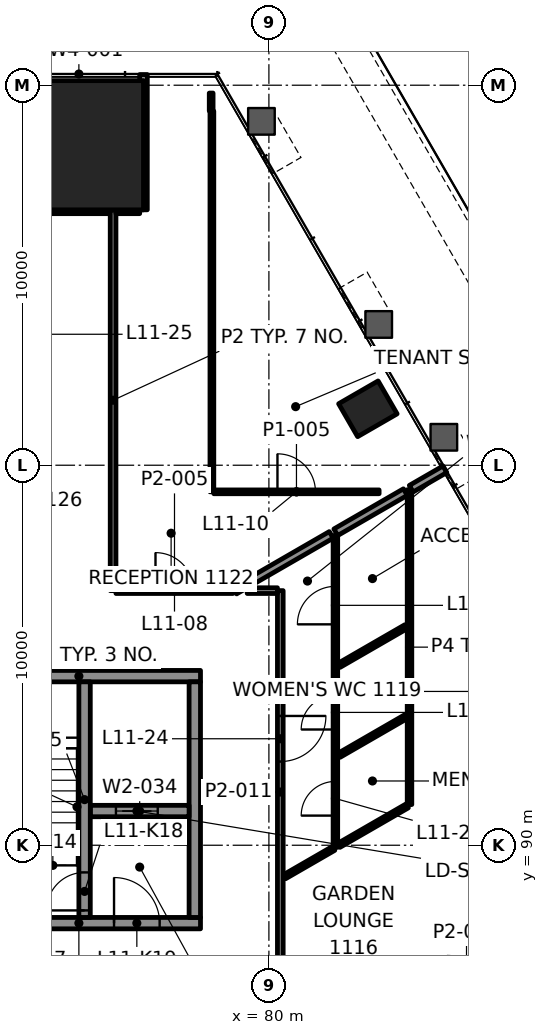
"""IFC4 building model, lengths in metres.
Left out: names, types, materials, properties, quantities, classifications, styles, units other than length and angle.
Written with IfcOpenShell. Run it as: python <this file> out.ifc"""

import sys

from ifc_helpers import new_model, si_unit, direction, frame, frame_2d, origin, origin_2d, place, context, subcontext, project, spatial, rectangle, extrude, element, fill, save


model = new_model("IFC4")
c1 = context("Model", 3, precision=1e-05, world=origin(), true_north=direction((0.0, 1.0)))
c2 = subcontext(c1, "Body", "Model", "MODEL_VIEW")
j1 = project(units=[si_unit("LENGTHUNIT", "METRE"), si_unit("PLANEANGLEUNIT", "RADIAN")], contexts=[c1])
p1 = place(None, origin())
s1 = spatial("IfcSite", under=j1, at=p1, CompositionType="ELEMENT")
p2 = place(p1, origin())
s2 = spatial("IfcBuilding", under=s1, at=p2, CompositionType="ELEMENT")
p3 = place(p2, frame((0.0, 0.0, 52.6)))
s3 = spatial("IfcBuildingStorey", under=s2, at=p3, CompositionType="ELEMENT", Elevation=52.6)
p4 = place(p3, frame((75.0, 108.42, 0.0), z_axis=(0.0, 0.0, 1.0), x_axis=(-1.0, 0.0, 0.0)))
e1 = element("IfcColumn", 1, at=p4, inside=s3, PredefinedType="COLUMN", context=c2, shape_type="SweptSolid", body=[
    extrude(rectangle(XDim=3.4, YDim=3.4, at=origin_2d()), origin(), (0.0, 0.0, 1.0), 4.2),
])
p5 = place(p3, frame((82.604, 101.485, -0.0), z_axis=(0.0, 0.0, 1.0), x_axis=(-0.5, 0.866025403784, 0.0)))
e2 = element("IfcColumn", 2, at=p5, inside=s3, PredefinedType="COLUMN", context=c2, shape_type="SweptSolid", body=[
    extrude(rectangle(XDim=1.0, YDim=1.2, at=origin_2d()), origin(), (0.0, 0.0, 1.0), 4.2),
])
p6 = place(p3, frame((71.8, 87.95, 0.0), z_axis=(0.0, 0.0, 1.0), x_axis=(1.0, 0.0, 0.0)))
e3 = element("IfcWall", 3, at=p6, inside=s3, PredefinedType="SHEAR", context=c2, shape_type="SweptSolid", body=[
    extrude(rectangle(XDim=6.4, YDim=0.3, at=frame_2d((3.2, 0.0))), origin(), (0.0, 0.0, 1.0), 4.0),
])
p7 = place(p6, frame((1.325, 0.0, 0.0)))
e4 = element("IfcOpeningElement", 4, at=p7, cuts=e3, PredefinedType="OPENING", context=c2, shape_type="SweptSolid", body=[
    extrude(rectangle(XDim=1.0, YDim=2.1, at=frame_2d((0.5, 1.05))), frame((0.0, 0.16, 0.0), z_axis=(0.0, -1.0, 0.0), x_axis=(1.0, 0.0, 0.0)), (0.0, 0.0, 1.0), 0.32),
])
p8 = place(p6, frame((4.125, 0.0, 0.0)))
e5 = element("IfcOpeningElement", 5, at=p8, cuts=e3, PredefinedType="OPENING", context=c2, shape_type="SweptSolid", body=[
    extrude(rectangle(XDim=1.2, YDim=2.1, at=frame_2d((0.6, 1.05))), frame((0.0, 0.16, 0.0), z_axis=(0.0, -1.0, 0.0), x_axis=(1.0, 0.0, 0.0)), (0.0, 0.0, 1.0), 0.32),
])
p9 = place(p3, frame((71.8, 94.45, 0.0), z_axis=(0.0, 0.0, 1.0), x_axis=(1.0, 0.0, 0.0)))
e6 = element("IfcWall", 6, at=p9, inside=s3, PredefinedType="SHEAR", context=c2, shape_type="SweptSolid", body=[
    extrude(rectangle(XDim=6.4, YDim=0.3, at=frame_2d((3.2, 0.0))), origin(), (0.0, 0.0, 1.0), 4.0),
])
p10 = place(p3, frame((78.05, 88.1, 0.0), z_axis=(0.0, 0.0, 1.0), x_axis=(0.0, 1.0, 0.0)))
e7 = element("IfcWall", 7, at=p10, inside=s3, PredefinedType="SHEAR", context=c2, shape_type="SweptSolid", body=[
    extrude(rectangle(XDim=6.2, YDim=0.3, at=frame_2d((3.1, 0.0))), origin(), (0.0, 0.0, 1.0), 4.0),
])
p11 = place(p3, frame((75.3, 90.9, 0.0), z_axis=(0.0, 0.0, 1.0), x_axis=(1.0, 0.0, 0.0)))
e8 = element("IfcWall", 8, at=p11, inside=s3, PredefinedType="SHEAR", context=c2, shape_type="SweptSolid", body=[
    extrude(rectangle(XDim=2.6, YDim=0.3, at=frame_2d((1.3, 0.0))), origin(), (0.0, 0.0, 1.0), 4.0),
])
p12 = place(p11, frame((0.675, 0.0, 0.0)))
e9 = element("IfcOpeningElement", 9, at=p12, cuts=e8, PredefinedType="OPENING", context=c2, shape_type="SweptSolid", body=[
    extrude(rectangle(XDim=1.1, YDim=2.1, at=frame_2d((0.55, 1.05))), frame((0.0, 0.16, 0.0), z_axis=(0.0, -1.0, 0.0), x_axis=(1.0, 0.0, 0.0)), (0.0, 0.0, 1.0), 0.32),
])
p13 = place(p3, frame((75.15, 88.1, 0.0), z_axis=(0.0, 0.0, 1.0), x_axis=(0.0, 1.0, 0.0)))
e10 = element("IfcWall", 10, at=p13, inside=s3, PredefinedType="SHEAR", context=c2, shape_type="SweptSolid", body=[
    extrude(rectangle(XDim=6.2, YDim=0.3, at=frame_2d((3.1, 0.0))), origin(), (0.0, 0.0, 1.0), 4.0),
])
p14 = place(p13, frame((0.185, 0.0, 0.0)))
e11 = element("IfcOpeningElement", 11, at=p14, cuts=e10, PredefinedType="OPENING", context=c2, shape_type="SweptSolid", body=[
    extrude(rectangle(XDim=1.0, YDim=2.1, at=frame_2d((0.5, 1.05))), frame((0.0, 0.16, 0.0), z_axis=(0.0, -1.0, 0.0), x_axis=(1.0, 0.0, 0.0)), (0.0, 0.0, 1.0), 0.32),
])
p15 = place(p3, frame((75.975, 96.7, 0.0), z_axis=(0.0, 0.0, 1.0), x_axis=(1.0, 0.0, 0.0)))
e12 = element("IfcWall", 12, at=p15, inside=s3, PredefinedType="PARTITIONING", context=c2, shape_type="SweptSolid", body=[
    extrude(rectangle(XDim=3.082, YDim=0.15, at=frame_2d((1.541, 0.0))), origin(), (0.0, 0.0, 1.0), 3.4),
])
p16 = place(p15, frame((1.041, 0.0, 0.0)))
e13 = element("IfcOpeningElement", 13, at=p16, cuts=e12, PredefinedType="OPENING", context=c2, shape_type="SweptSolid", body=[
    extrude(rectangle(XDim=1.0, YDim=2.1, at=frame_2d((0.5, 1.05))), frame((0.0, 0.085, 0.0), z_axis=(0.0, -1.0, 0.0), x_axis=(1.0, 0.0, 0.0)), (0.0, 0.0, 1.0), 0.17),
])
p17 = place(p3, frame((78.551, 99.3, 0.0), z_axis=(0.0, 0.0, 1.0), x_axis=(1.0, 0.0, 0.0)))
e14 = element("IfcWall", 14, at=p17, inside=s3, PredefinedType="PARTITIONING", context=c2, shape_type="SweptSolid", body=[
    extrude(rectangle(XDim=4.349, YDim=0.1, at=frame_2d((2.175, 0.0))), origin(), (0.0, 0.0, 1.0), 3.4),
])
p18 = place(p17, frame((1.675, 0.0, 0.0)))
e15 = element("IfcOpeningElement", 15, at=p18, cuts=e14, PredefinedType="OPENING", context=c2, shape_type="SweptSolid", body=[
    extrude(rectangle(XDim=1.0, YDim=2.1, at=frame_2d((0.5, 1.05))), frame((0.0, 0.06, 0.0), z_axis=(0.0, -1.0, 0.0), x_axis=(1.0, 0.0, 0.0)), (0.0, 0.0, 1.0), 0.12),
])
p19 = place(p3, frame((74.176, 106.72, 0.0), z_axis=(0.0, 0.0, 1.0), x_axis=(1.0, 0.0, 0.0)))
e16 = element("IfcWall", 16, at=p19, inside=s3, PredefinedType="PARTITIONING", context=c2, shape_type="SweptSolid", body=[
    extrude(rectangle(XDim=1.649, YDim=0.2, at=frame_2d((0.825, 0.0))), origin(), (0.0, 0.0, 1.0), 3.397),
])
p20 = place(p3, frame((80.41, 89.17, 0.0), z_axis=(0.0, 0.0, 1.0), x_axis=(0.866055123991, 0.49994851956, 0.0)))
e17 = element("IfcWall", 17, at=p20, inside=s3, PredefinedType="PARTITIONING", context=c2, shape_type="SweptSolid", body=[
    extrude(rectangle(XDim=1.496, YDim=0.12, at=frame_2d((0.748, 0.0))), origin(), (0.0, 0.0, 1.0), 3.4),
])
p21 = place(p3, frame((81.845, 92.366, 0.0), z_axis=(0.0, 0.0, 1.0), x_axis=(0.866069607179, 0.499923429657, 0.0)))
e18 = element("IfcWall", 18, at=p21, inside=s3, PredefinedType="PARTITIONING", context=c2, shape_type="SweptSolid", body=[
    extrude(rectangle(XDim=2.033, YDim=0.12, at=frame_2d((1.017, 0.0))), origin(), (0.0, 0.0, 1.0), 3.4),
])
p22 = place(p3, frame((81.845, 94.733, 0.0), z_axis=(0.0, 0.0, 1.0), x_axis=(0.866017611601, 0.500013496215, 0.0)))
e19 = element("IfcWall", 19, at=p22, inside=s3, PredefinedType="PARTITIONING", context=c2, shape_type="SweptSolid", body=[
    extrude(rectangle(XDim=2.033, YDim=0.12, at=frame_2d((1.017, 0.0))), origin(), (0.0, 0.0, 1.0), 3.4),
])
p23 = place(p3, frame((79.1, 96.7, 0.0), z_axis=(0.0, 0.0, 1.0), x_axis=(0.866031706645, 0.499989082967, 0.0)))
e20 = element("IfcWall", 20, at=p23, inside=s3, PredefinedType="PARTITIONING", context=c2, shape_type="SweptSolid", body=[
    extrude(rectangle(XDim=2.933, YDim=0.2, at=frame_2d((1.466, 0.0))), origin(), (0.0, 0.0, 1.0), 3.4),
])
p24 = place(p3, frame((83.7, 91.07, 0.0), z_axis=(0.0, 0.0, 1.0), x_axis=(0.0, 1.0, 0.0)))
e21 = element("IfcWall", 21, at=p24, inside=s3, PredefinedType="PARTITIONING", context=c2, shape_type="SweptSolid", body=[
    extrude(rectangle(XDim=8.285, YDim=0.12, at=frame_2d((4.143, 0.0))), origin(), (0.0, 0.0, 1.0), 3.165),
])
p25 = place(p3, frame((81.75, 89.944, 0.0), z_axis=(0.0, 0.0, 1.0), x_axis=(0.0, 1.0, 0.0)))
e22 = element("IfcWall", 22, at=p25, inside=s3, PredefinedType="PARTITIONING", context=c2, shape_type="SweptSolid", body=[
    extrude(rectangle(XDim=8.206, YDim=0.12, at=frame_2d((4.103, 0.0))), origin(), (0.0, 0.0, 1.0), 3.4),
])
p26 = place(p25, frame((0.835, 0.0, 0.0)))
e23 = element("IfcOpeningElement", 23, at=p26, cuts=e22, PredefinedType="OPENING", context=c2, shape_type="SweptSolid", body=[
    extrude(rectangle(XDim=0.9, YDim=2.1, at=frame_2d((0.45, 1.05))), frame((0.0, 0.07, 0.0), z_axis=(0.0, -1.0, 0.0), x_axis=(1.0, 0.0, 0.0)), (0.0, 0.0, 1.0), 0.14),
])
p27 = place(p25, frame((3.101, 0.0, 0.0)))
e24 = element("IfcOpeningElement", 24, at=p27, cuts=e22, PredefinedType="OPENING", context=c2, shape_type="SweptSolid", body=[
    extrude(rectangle(XDim=0.9, YDim=2.1, at=frame_2d((0.45, 1.05))), frame((0.0, 0.07, 0.0), z_axis=(0.0, -1.0, 0.0), x_axis=(1.0, 0.0, 0.0)), (0.0, 0.0, 1.0), 0.14),
])
p28 = place(p25, frame((5.869, 0.0, 0.0)))
e25 = element("IfcOpeningElement", 25, at=p28, cuts=e22, PredefinedType="OPENING", context=c2, shape_type="SweptSolid", body=[
    extrude(rectangle(XDim=1.0, YDim=2.1, at=frame_2d((0.5, 1.05))), frame((0.0, 0.07, 0.0), z_axis=(0.0, -1.0, 0.0), x_axis=(1.0, 0.0, 0.0)), (0.0, 0.0, 1.0), 0.14),
])
p29 = place(p3, frame((80.3, 96.7, 0.0), z_axis=(0.0, 0.0, 1.0), x_axis=(0.0, -1.0, 0.0)))
e26 = element("IfcWall", 26, at=p29, inside=s3, PredefinedType="PARTITIONING", context=c2, shape_type="SweptSolid", body=[
    extrude(rectangle(XDim=10.6, YDim=0.15, at=frame_2d((5.3, 0.0))), origin(), (0.0, 0.0, 1.0), 3.4),
])
p30 = place(p29, frame((3.298, 0.0, 0.0)))
e27 = element("IfcOpeningElement", 27, at=p30, cuts=e26, PredefinedType="OPENING", context=c2, shape_type="SweptSolid", body=[
    extrude(rectangle(XDim=1.2, YDim=2.1, at=frame_2d((0.6, 1.05))), frame((0.0, 0.085, 0.0), z_axis=(0.0, -1.0, 0.0), x_axis=(1.0, 0.0, 0.0)), (0.0, 0.0, 1.0), 0.17),
])
p31 = place(p3, frame((78.5, 99.301, 0.0), z_axis=(0.0, 0.0, 1.0), x_axis=(0.0, 1.0, 0.0)))
e28 = element("IfcWall", 28, at=p31, inside=s3, PredefinedType="PARTITIONING", context=c2, shape_type="SweptSolid", body=[
    extrude(rectangle(XDim=10.02, YDim=0.1, at=frame_2d((5.01, 0.0))), origin(), (0.0, 0.0, 1.0), 3.4),
])
p32 = place(p3, frame((78.481, 109.321, 0.0), z_axis=(0.0, 0.0, 1.0), x_axis=(0.0, 1.0, 0.0)))
e29 = element("IfcWall", 29, at=p32, inside=s3, PredefinedType="PARTITIONING", context=c2, shape_type="SweptSolid", body=[
    extrude(rectangle(XDim=0.473, YDim=0.1, at=frame_2d((0.236, 0.0))), origin(), (0.0, 0.0, 1.0), 3.4),
])
p33 = place(p3, frame((76.7, 106.721, 0.0), z_axis=(0.0, 0.0, 1.0), x_axis=(0.0, 1.0, 0.0)))
e30 = element("IfcWall", 30, at=p33, inside=s3, PredefinedType="PARTITIONING", context=c2, shape_type="SweptSolid", body=[
    extrude(rectangle(XDim=3.56, YDim=0.2, at=frame_2d((1.78, 0.0))), origin(), (0.0, 0.0, 1.0), 3.4),
])
p34 = place(p3, frame((75.9, 96.7, 0.0), z_axis=(0.0, 0.0, 1.0), x_axis=(0.0, 1.0, 0.0)))
e31 = element("IfcWall", 31, at=p34, inside=s3, PredefinedType="PARTITIONING", context=c2, shape_type="SweptSolid", body=[
    extrude(rectangle(XDim=10.02, YDim=0.15, at=frame_2d((5.01, 0.0))), origin(), (0.0, 0.0, 1.0), 3.4),
])
p35 = place(p3, frame((79.429, 96.7, 0.0), z_axis=(0.0, 0.0, 1.0), x_axis=(1.0, 0.0, 0.0)))
e32 = element("IfcWall", 32, at=p35, inside=s3, PredefinedType="PARTITIONING", context=c2, shape_type="SweptSolid", body=[
    extrude(rectangle(XDim=0.796, YDim=0.15, at=frame_2d((0.398, 0.0))), origin(), (0.0, 0.0, 1.0), 3.4),
])
p36 = place(p3, frame((75.975, 106.72, 0.0), z_axis=(0.0, 0.0, 1.0), x_axis=(1.0, 0.0, 0.0)))
e33 = element("IfcWall", 33, at=p36, inside=s3, PredefinedType="PARTITIONING", context=c2, shape_type="SweptSolid", body=[
    extrude(rectangle(XDim=0.625, YDim=0.2, at=frame_2d((0.312, 0.0))), origin(), (0.0, 0.0, 1.0), 3.4),
])
p37 = place(p3, frame((81.84, 89.996, 0.0), z_axis=(0.0, 0.0, 1.0), x_axis=(0.866015411258, 0.500017307165, 0.0)))
e34 = element("IfcWall", 34, at=p37, inside=s3, PredefinedType="PARTITIONING", context=c2, shape_type="SweptSolid", body=[
    extrude(rectangle(XDim=2.079, YDim=0.12, at=frame_2d((1.039, 0.0))), origin(), (0.0, 0.0, 1.0), 3.4),
])
p38 = place(p3, frame((83.745, 99.382, 0.0), z_axis=(0.0, 0.0, 1.0), x_axis=(0.866062461731, 0.499935808259, 0.0)))
e35 = element("IfcWall", 35, at=p38, inside=s3, PredefinedType="PARTITIONING", context=c2, shape_type="SweptSolid", body=[
    extrude(rectangle(XDim=1.024, YDim=0.2, at=frame_2d((0.512, 0.0))), origin(), (0.0, 0.0, 1.0), 3.165),
])
p39 = place(p3, frame((81.76, 98.236, 0.0), z_axis=(0.0, 0.0, 1.0), x_axis=(0.866037425094, 0.499979177903, 0.0)))
e36 = element("IfcWall", 36, at=p39, inside=s3, PredefinedType="PARTITIONING", context=c2, shape_type="SweptSolid", body=[
    extrude(rectangle(XDim=2.113, YDim=0.2, at=frame_2d((1.056, 0.0))), origin(), (0.0, 0.0, 1.0), 3.4),
])
p40 = place(p3, frame((110.994, 61.012, 0.0), z_axis=(0.0, 0.0, 1.0), x_axis=(-0.500000853759, 0.866024910866, 0.0)))
e37 = element("IfcWall", 37, at=p40, inside=s3, PredefinedType="SOLIDWALL", context=c2, shape_type="SweptSolid", body=[
    extrude(rectangle(XDim=60.222, YDim=0.8, at=frame_2d((30.111, 0.0))), origin(), (0.0, 0.0, 1.0), 0.9),
])
p41 = place(p16, origin())
e38 = element("IfcDoor", 38, at=p41, inside=s3, OperationType="SINGLE_SWING_LEFT", PredefinedType="DOOR", context=c2, shape_type="SweptSolid", body=[
    extrude(rectangle(XDim=1.0, YDim=2.1, at=frame_2d((0.5, 1.05))), frame((0.0, 0.025, 0.0), z_axis=(0.0, -1.0, 0.0), x_axis=(1.0, 0.0, 0.0)), (0.0, 0.0, 1.0), 0.05),
])
fill(e13, e38)
p42 = place(p18, origin())
e39 = element("IfcDoor", 39, at=p42, inside=s3, OperationType="SINGLE_SWING_RIGHT", PredefinedType="DOOR", context=c2, shape_type="SweptSolid", body=[
    extrude(rectangle(XDim=1.0, YDim=2.1, at=frame_2d((0.5, 1.05))), frame((0.0, 0.025, 0.0), z_axis=(0.0, -1.0, 0.0), x_axis=(1.0, 0.0, 0.0)), (0.0, 0.0, 1.0), 0.05),
])
fill(e15, e39)
p43 = place(p26, origin())
e40 = element("IfcDoor", 40, at=p43, inside=s3, OperationType="SINGLE_SWING_LEFT", PredefinedType="DOOR", context=c2, shape_type="SweptSolid", body=[
    extrude(rectangle(XDim=0.9, YDim=2.1, at=frame_2d((0.45, 1.05))), frame((0.0, 0.025, 0.0), z_axis=(0.0, -1.0, 0.0), x_axis=(1.0, 0.0, 0.0)), (0.0, 0.0, 1.0), 0.05),
])
fill(e23, e40)
p44 = place(p27, origin())
e41 = element("IfcDoor", 41, at=p44, inside=s3, OperationType="SINGLE_SWING_RIGHT", PredefinedType="DOOR", context=c2, shape_type="SweptSolid", body=[
    extrude(rectangle(XDim=0.9, YDim=2.1, at=frame_2d((0.45, 1.05))), frame((0.0, 0.025, 0.0), z_axis=(0.0, -1.0, 0.0), x_axis=(1.0, 0.0, 0.0)), (0.0, 0.0, 1.0), 0.05),
])
fill(e24, e41)
p45 = place(p28, origin())
e42 = element("IfcDoor", 42, at=p45, inside=s3, OperationType="SINGLE_SWING_LEFT", PredefinedType="DOOR", context=c2, shape_type="SweptSolid", body=[
    extrude(rectangle(XDim=1.0, YDim=2.1, at=frame_2d((0.5, 1.05))), frame((0.0, 0.025, 0.0), z_axis=(0.0, -1.0, 0.0), x_axis=(1.0, 0.0, 0.0)), (0.0, 0.0, 1.0), 0.05),
])
fill(e25, e42)
p46 = place(p30, origin())
e43 = element("IfcDoor", 43, at=p46, inside=s3, OperationType="DOUBLE_DOOR_SINGLE_SWING", PredefinedType="DOOR", context=c2, shape_type="SweptSolid", body=[
    extrude(rectangle(XDim=1.2, YDim=2.1, at=frame_2d((0.6, 1.05))), frame((0.0, 0.025, 0.0), z_axis=(0.0, -1.0, 0.0), x_axis=(1.0, 0.0, 0.0)), (0.0, 0.0, 1.0), 0.05),
])
fill(e27, e43)
p47 = place(p12, origin())
e44 = element("IfcDoor", 44, at=p47, inside=s3, OperationType="DOUBLE_DOOR_SLIDING", PredefinedType="DOOR", context=c2, shape_type="SweptSolid", body=[
    extrude(rectangle(XDim=1.1, YDim=2.1, at=frame_2d((0.55, 1.05))), frame((0.0, 0.025, 0.0), z_axis=(0.0, -1.0, 0.0), x_axis=(1.0, 0.0, 0.0)), (0.0, 0.0, 1.0), 0.05),
])
fill(e9, e44)
p48 = place(p14, origin())
e45 = element("IfcDoor", 45, at=p48, inside=s3, OperationType="SINGLE_SWING_LEFT", PredefinedType="DOOR", context=c2, shape_type="SweptSolid", body=[
    extrude(rectangle(XDim=1.0, YDim=2.1, at=frame_2d((0.5, 1.05))), frame((0.0, 0.025, 0.0), z_axis=(0.0, -1.0, 0.0), x_axis=(1.0, 0.0, 0.0)), (0.0, 0.0, 1.0), 0.05),
])
fill(e11, e45)
p49 = place(p8, origin())
e46 = element("IfcDoor", 46, at=p49, inside=s3, OperationType="SINGLE_SWING_RIGHT", PredefinedType="DOOR", context=c2, shape_type="SweptSolid", body=[
    extrude(rectangle(XDim=1.2, YDim=2.1, at=frame_2d((0.6, 1.05))), frame((0.0, 0.025, 0.0), z_axis=(0.0, -1.0, 0.0), x_axis=(1.0, 0.0, 0.0)), (0.0, 0.0, 1.0), 0.05),
])
fill(e5, e46)
save(model, sys.argv[1])
